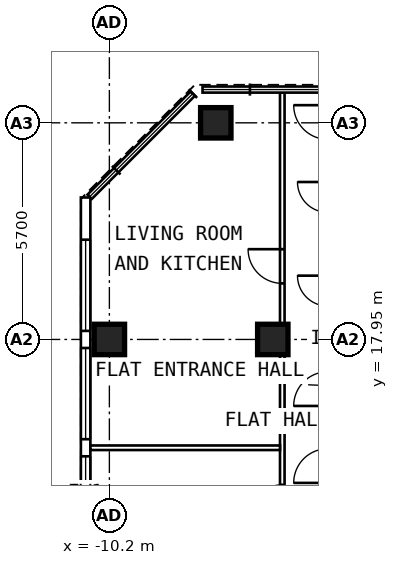
"""IFC4 building model, lengths in metres.
Left out: names, types, materials, properties, quantities, classifications, styles, units other than length and angle.
Written with IfcOpenShell. Run it as: python <this file> out.ifc"""

import sys

from ifc_helpers import new_model, si_unit, direction, frame, frame_2d, origin, origin_2d, place, context, subcontext, project, spatial, rectangle, extrude, element, fill, save


model = new_model("IFC4")
c1 = context("Model", 3, precision=1e-05, world=origin(), true_north=direction((0.0, 1.0)))
c2 = subcontext(c1, "Body", "Model", "MODEL_VIEW")
j1 = project(units=[si_unit("LENGTHUNIT", "METRE"), si_unit("PLANEANGLEUNIT", "RADIAN")], contexts=[c1])
p1 = place(None, origin())
s1 = spatial("IfcSite", under=j1, at=p1, CompositionType="ELEMENT")
p2 = place(p1, origin())
s2 = spatial("IfcBuilding", under=s1, at=p2, CompositionType="ELEMENT")
p3 = place(p2, frame((0.0, 0.0, 271.0)))
s3 = spatial("IfcBuildingStorey", under=s2, at=p3, CompositionType="ELEMENT", Elevation=271.0)
for number, where, z_axis, x_axis in (
    (1, (-10.2, 17.95, 0.0), (0.0, 0.0, 1.0), (0.0, 1.0, 0.0)),
    (2, (-7.4, 23.65, 0.0), (0.0, 0.0, 1.0), (0.0, 1.0, 0.0)),
    (3, (-5.9, 17.95, 0.0), (0.0, 0.0, 1.0), (0.0, 1.0, 0.0)),
):
    element("IfcColumn", number, at=place(p3, frame(where, z_axis=z_axis, x_axis=x_axis)), inside=s3, PredefinedType="COLUMN", context=c2, shape_type="SweptSolid", body=[
        extrude(rectangle(XDim=0.8, YDim=0.8, at=origin_2d()), origin(), (0.0, 0.0, 1.0), 3.6),
    ])
p4 = place(p3, frame((-10.825, 6.148, 0.0), z_axis=(0.0, 0.0, 1.0), x_axis=(0.0, 1.0, 0.0)))
e4 = element("IfcWall", 4, at=p4, inside=s3, PredefinedType="SOLIDWALL", context=c2, shape_type="SweptSolid", body=[
    extrude(rectangle(XDim=15.537, YDim=0.25, at=frame_2d((7.769, 0.0))), origin(), (0.0, 0.0, 1.0), 3.35),
])
p5 = place(p4, frame((0.627, 0.0, 0.6)))
e5 = element("IfcOpeningElement", 5, at=p5, cuts=e4, PredefinedType="OPENING", context=c2, shape_type="SweptSolid", body=[
    extrude(rectangle(XDim=2.4, YDim=2.0, at=frame_2d((1.2, 1.0))), frame((0.0, 0.137, 0.0), z_axis=(0.0, -1.0, 0.0), x_axis=(1.0, 0.0, 0.0)), (0.0, 0.0, 1.0), 0.274),
])
p6 = place(p4, frame((3.477, 0.0, 0.6)))
e6 = element("IfcOpeningElement", 6, at=p6, cuts=e4, PredefinedType="OPENING", context=c2, shape_type="SweptSolid", body=[
    extrude(rectangle(XDim=2.4, YDim=2.0, at=frame_2d((1.2, 1.0))), frame((0.0, 0.137, 0.0), z_axis=(0.0, -1.0, 0.0), x_axis=(1.0, 0.0, 0.0)), (0.0, 0.0, 1.0), 0.274),
])
p7 = place(p4, frame((6.327, 0.0, 0.6)))
e7 = element("IfcOpeningElement", 7, at=p7, cuts=e4, PredefinedType="OPENING", context=c2, shape_type="SweptSolid", body=[
    extrude(rectangle(XDim=2.4, YDim=2.0, at=frame_2d((1.2, 1.0))), frame((0.0, 0.137, 0.0), z_axis=(0.0, -1.0, 0.0), x_axis=(1.0, 0.0, 0.0)), (0.0, 0.0, 1.0), 0.274),
])
p8 = place(p4, frame((9.177, 0.0, 0.6)))
e8 = element("IfcOpeningElement", 8, at=p8, cuts=e4, PredefinedType="OPENING", context=c2, shape_type="SweptSolid", body=[
    extrude(rectangle(XDim=2.4, YDim=2.0, at=frame_2d((1.2, 1.0))), frame((0.0, 0.137, 0.0), z_axis=(0.0, -1.0, 0.0), x_axis=(1.0, 0.0, 0.0)), (0.0, 0.0, 1.0), 0.274),
])
p9 = place(p4, frame((12.027, 0.0, 0.6)))
e9 = element("IfcOpeningElement", 9, at=p9, cuts=e4, PredefinedType="OPENING", context=c2, shape_type="SweptSolid", body=[
    extrude(rectangle(XDim=2.4, YDim=2.0, at=frame_2d((1.2, 1.0))), frame((0.0, 0.137, 0.0), z_axis=(0.0, -1.0, 0.0), x_axis=(1.0, 0.0, 0.0)), (0.0, 0.0, 1.0), 0.274),
])
p10 = place(p3, frame((-5.65, 9.6, 0.0), z_axis=(0.0, 0.0, 1.0), x_axis=(0.0, 1.0, 0.0)))
e10 = element("IfcWall", 10, at=p10, inside=s3, PredefinedType="PARTITIONING", context=c2, shape_type="SweptSolid", body=[
    extrude(rectangle(XDim=14.845, YDim=0.12, at=frame_2d((7.422, 0.0))), origin(), (0.0, 0.0, 1.0), 3.35),
])
p11 = place(p10, frame((1.075, 0.0, 0.0)))
e11 = element("IfcOpeningElement", 11, at=p11, cuts=e10, PredefinedType="OPENING", context=c2, shape_type="SweptSolid", body=[
    extrude(rectangle(XDim=0.9, YDim=2.1, at=frame_2d((0.45, 1.05))), frame((0.0, 0.072, 0.0), z_axis=(0.0, -1.0, 0.0), x_axis=(1.0, 0.0, 0.0)), (0.0, 0.0, 1.0), 0.144),
])
p12 = place(p10, frame((3.625, 0.0, 0.0)))
e12 = element("IfcOpeningElement", 12, at=p12, cuts=e10, PredefinedType="OPENING", context=c2, shape_type="SweptSolid", body=[
    extrude(rectangle(XDim=0.9, YDim=2.1, at=frame_2d((0.45, 1.05))), frame((0.0, 0.072, 0.0), z_axis=(0.0, -1.0, 0.0), x_axis=(1.0, 0.0, 0.0)), (0.0, 0.0, 1.0), 0.144),
])
p13 = place(p10, frame((9.825, 0.0, 0.0)))
e13 = element("IfcOpeningElement", 13, at=p13, cuts=e10, PredefinedType="OPENING", context=c2, shape_type="SweptSolid", body=[
    extrude(rectangle(XDim=0.9, YDim=2.1, at=frame_2d((0.45, 1.05))), frame((0.0, 0.072, 0.0), z_axis=(0.0, -1.0, 0.0), x_axis=(1.0, 0.0, 0.0)), (0.0, 0.0, 1.0), 0.144),
])
p14 = place(p3, frame((-5.71, 15.1, 0.0), z_axis=(0.0, 0.0, 1.0), x_axis=(-1.0, 0.0, 0.0)))
e14 = element("IfcWall", 14, at=p14, inside=s3, PredefinedType="PARTITIONING", context=c2, shape_type="SweptSolid", body=[
    extrude(rectangle(XDim=4.99, YDim=0.12, at=frame_2d((2.495, 0.0))), origin(), (0.0, 0.0, 1.0), 3.35),
])
p15 = place(p7, origin())
e15 = element("IfcWindow", 15, at=p15, inside=s3, PartitioningType="SINGLE_PANEL", PredefinedType="WINDOW", context=c2, shape_type="SweptSolid", body=[
    extrude(rectangle(XDim=2.4, YDim=2.0, at=frame_2d((1.2, 1.0))), frame((0.0, 0.03, 0.0), z_axis=(0.0, -1.0, 0.0), x_axis=(1.0, 0.0, 0.0)), (0.0, 0.0, 1.0), 0.06),
])
fill(e7, e15)
p16 = place(p8, origin())
e16 = element("IfcWindow", 16, at=p16, inside=s3, PartitioningType="SINGLE_PANEL", PredefinedType="WINDOW", context=c2, shape_type="SweptSolid", body=[
    extrude(rectangle(XDim=2.4, YDim=2.0, at=frame_2d((1.2, 1.0))), frame((0.0, 0.03, 0.0), z_axis=(0.0, -1.0, 0.0), x_axis=(1.0, 0.0, 0.0)), (0.0, 0.0, 1.0), 0.06),
])
fill(e8, e16)
p17 = place(p9, origin())
e17 = element("IfcWindow", 17, at=p17, inside=s3, PartitioningType="SINGLE_PANEL", PredefinedType="WINDOW", context=c2, shape_type="SweptSolid", body=[
    extrude(rectangle(XDim=2.4, YDim=2.0, at=frame_2d((1.2, 1.0))), frame((0.0, 0.03, 0.0), z_axis=(0.0, -1.0, 0.0), x_axis=(1.0, 0.0, 0.0)), (0.0, 0.0, 1.0), 0.06),
])
fill(e9, e17)
p18 = place(p12, origin())
e18 = element("IfcDoor", 18, at=p18, inside=s3, OperationType="SINGLE_SWING_LEFT", PredefinedType="DOOR", context=c2, shape_type="SweptSolid", body=[
    extrude(rectangle(XDim=0.9, YDim=2.1, at=frame_2d((0.45, 1.05))), frame((0.0, 0.025, 0.0), z_axis=(0.0, -1.0, 0.0), x_axis=(1.0, 0.0, 0.0)), (0.0, 0.0, 1.0), 0.05),
])
fill(e12, e18)
p19 = place(p13, origin())
e19 = element("IfcDoor", 19, at=p19, inside=s3, OperationType="SINGLE_SWING_RIGHT", PredefinedType="DOOR", context=c2, shape_type="SweptSolid", body=[
    extrude(rectangle(XDim=0.9, YDim=2.1, at=frame_2d((0.45, 1.05))), frame((0.0, 0.025, 0.0), z_axis=(0.0, -1.0, 0.0), x_axis=(1.0, 0.0, 0.0)), (0.0, 0.0, 1.0), 0.05),
])
fill(e13, e19)
save(model, sys.argv[1])
